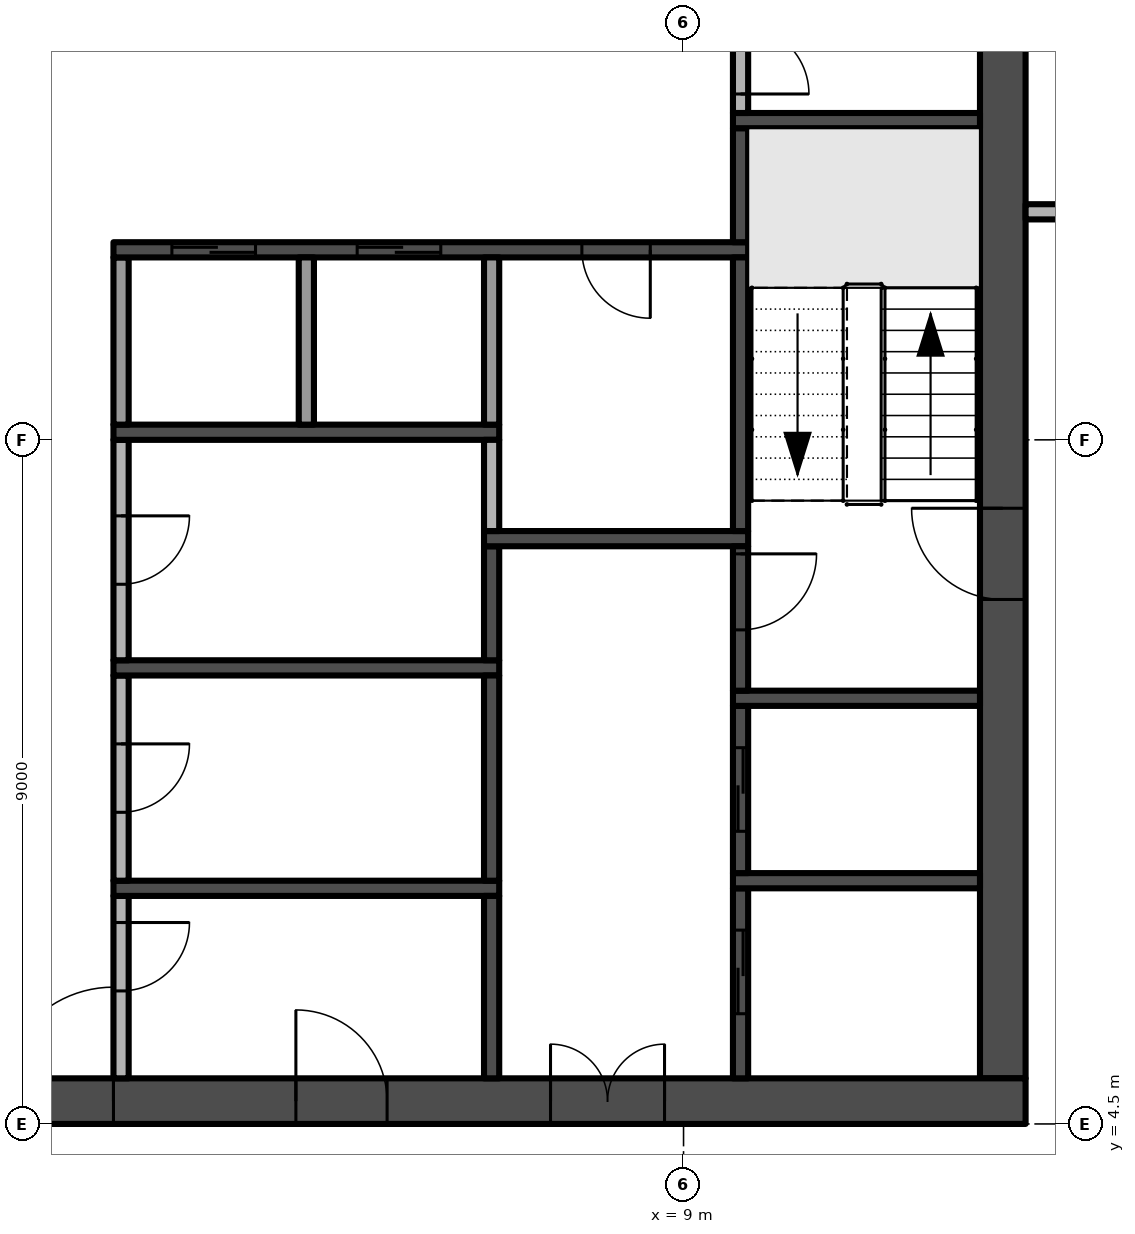
"""IFC4 building model, lengths in metres.
Left out: names, types, materials, properties, quantities, classifications, styles, units other than length and angle.
Written with IfcOpenShell. Run it as: python <this file> out.ifc"""

import sys

from ifc_helpers import new_model, si_unit, direction, frame, frame_2d, origin, place, context, subcontext, project, spatial, rectangle, extrude, element, fill, save


model = new_model("IFC4")
c1 = context("Model", 3, precision=1e-05, world=origin(), true_north=direction((0.0, 1.0)))
c2 = subcontext(c1, "Body", "Model", "MODEL_VIEW")
j1 = project(units=[si_unit("LENGTHUNIT", "METRE"), si_unit("PLANEANGLEUNIT", "RADIAN")], contexts=[c1])
p1 = place(None, origin())
s1 = spatial("IfcSite", under=j1, at=p1, CompositionType="ELEMENT")
p2 = place(p1, origin())
s2 = spatial("IfcBuilding", under=s1, at=p2, CompositionType="ELEMENT")
p3 = place(p2, frame((0.0, 0.0, 230.0)))
s3 = spatial("IfcBuildingStorey", under=s2, at=p3, CompositionType="ELEMENT", Elevation=230.0)
p4 = place(p3, frame((-13.5, 4.8, -0.3), z_axis=(0.0, 0.0, 1.0), x_axis=(1.0, 0.0, 0.0)))
e1 = element("IfcWall", 1, at=p4, inside=s3, PredefinedType="SHEAR", context=c2, shape_type="SweptSolid", body=[
    extrude(rectangle(XDim=27.0, YDim=0.6, at=frame_2d((13.5, 0.0))), origin(), (0.0, 0.0, 1.0), 3.8),
])
p5 = place(p4, frame((12.0, 0.0, 0.3)))
e2 = element("IfcOpeningElement", 2, at=p5, cuts=e1, PredefinedType="OPENING", context=c2, shape_type="SweptSolid", body=[
    extrude(rectangle(XDim=3.0, YDim=2.4, at=frame_2d((1.5, 1.2))), frame((0.0, 0.31, 0.0), z_axis=(0.0, -1.0, 0.0), x_axis=(1.0, 0.0, 0.0)), (0.0, 0.0, 1.0), 0.62),
])
p6 = place(p4, frame((4.9, 0.0, 0.3)))
e3 = element("IfcOpeningElement", 3, at=p6, cuts=e1, PredefinedType="OPENING", context=c2, shape_type="SweptSolid", body=[
    extrude(rectangle(XDim=1.2, YDim=2.2, at=frame_2d((0.6, 1.1))), frame((0.0, 0.31, 0.0), z_axis=(0.0, -1.0, 0.0), x_axis=(1.0, 0.0, 0.0)), (0.0, 0.0, 1.0), 0.62),
])
p7 = place(p4, frame((20.75, 0.0, 0.3)))
e4 = element("IfcOpeningElement", 4, at=p7, cuts=e1, PredefinedType="OPENING", context=c2, shape_type="SweptSolid", body=[
    extrude(rectangle(XDim=1.5, YDim=2.2, at=frame_2d((0.75, 1.1))), frame((0.0, 0.31, 0.0), z_axis=(0.0, -1.0, 0.0), x_axis=(1.0, 0.0, 0.0)), (0.0, 0.0, 1.0), 0.62),
])
p8 = place(p4, frame((17.4, 0.0, 0.3)))
e5 = element("IfcOpeningElement", 5, at=p8, cuts=e1, PredefinedType="OPENING", context=c2, shape_type="SweptSolid", body=[
    extrude(rectangle(XDim=1.2, YDim=2.2, at=frame_2d((0.6, 1.1))), frame((0.0, 0.31, 0.0), z_axis=(0.0, -1.0, 0.0), x_axis=(1.0, 0.0, 0.0)), (0.0, 0.0, 1.0), 0.62),
])
p9 = place(p3, frame((13.2, 5.1, -0.3), z_axis=(0.0, 0.0, 1.0), x_axis=(0.0, 1.0, 0.0)))
e6 = element("IfcWall", 6, at=p9, inside=s3, PredefinedType="SHEAR", context=c2, shape_type="SweptSolid", body=[
    extrude(rectangle(XDim=16.8, YDim=0.6, at=frame_2d((8.4, 0.0))), origin(), (0.0, 0.0, 1.0), 3.8),
])
p10 = place(p9, frame((6.3, 0.0, 0.3)))
e7 = element("IfcOpeningElement", 7, at=p10, cuts=e6, PredefinedType="OPENING", context=c2, shape_type="SweptSolid", body=[
    extrude(rectangle(XDim=1.2, YDim=2.2, at=frame_2d((0.6, 1.1))), frame((0.0, 0.31, 0.0), z_axis=(0.0, -1.0, 0.0), x_axis=(1.0, 0.0, 0.0)), (0.0, 0.0, 1.0), 0.62),
])
p11 = place(p3, frame((1.6, 7.5, 0.0), z_axis=(0.0, 0.0, 1.0), x_axis=(0.0, -1.0, 0.0)))
e8 = element("IfcWall", 8, at=p11, inside=s3, PredefinedType="PARTITIONING", context=c2, shape_type="SweptSolid", body=[
    extrude(rectangle(XDim=2.4, YDim=0.2, at=frame_2d((1.2, 0.0))), origin(), (0.0, 0.0, 1.0), 3.5),
])
p12 = place(p11, frame((0.35, 0.0, 0.0)))
e9 = element("IfcOpeningElement", 9, at=p12, cuts=e8, PredefinedType="OPENING", context=c2, shape_type="SweptSolid", body=[
    extrude(rectangle(XDim=0.9, YDim=2.1, at=frame_2d((0.45, 1.05))), frame((0.0, 0.11, 0.0), z_axis=(0.0, -1.0, 0.0), x_axis=(1.0, 0.0, 0.0)), (0.0, 0.0, 1.0), 0.22),
])
p13 = place(p3, frame((1.5, 7.6, 0.0), z_axis=(0.0, 0.0, 1.0), x_axis=(1.0, 0.0, 0.0)))
e10 = element("IfcWall", 10, at=p13, inside=s3, PredefinedType="SHEAR", context=c2, shape_type="SweptSolid", body=[
    extrude(rectangle(XDim=5.075, YDim=0.2, at=frame_2d((2.538, 0.0))), origin(), (0.0, 0.0, 1.0), 3.5),
])
p14 = place(p3, frame((1.6, 10.4, 0.0), z_axis=(0.0, 0.0, 1.0), x_axis=(0.0, -1.0, 0.0)))
e11 = element("IfcWall", 11, at=p14, inside=s3, PredefinedType="PARTITIONING", context=c2, shape_type="SweptSolid", body=[
    extrude(rectangle(XDim=2.7, YDim=0.2, at=frame_2d((1.35, 0.0))), origin(), (0.0, 0.0, 1.0), 3.5),
])
p15 = place(p14, frame((0.9, 0.0, 0.0)))
e12 = element("IfcOpeningElement", 12, at=p15, cuts=e11, PredefinedType="OPENING", context=c2, shape_type="SweptSolid", body=[
    extrude(rectangle(XDim=0.9, YDim=2.1, at=frame_2d((0.45, 1.05))), frame((0.0, 0.11, 0.0), z_axis=(0.0, -1.0, 0.0), x_axis=(1.0, 0.0, 0.0)), (0.0, 0.0, 1.0), 0.22),
])
p16 = place(p3, frame((1.5, 10.5, 0.0), z_axis=(0.0, 0.0, 1.0), x_axis=(1.0, 0.0, 0.0)))
e13 = element("IfcWall", 13, at=p16, inside=s3, PredefinedType="SHEAR", context=c2, shape_type="SweptSolid", body=[
    extrude(rectangle(XDim=5.075, YDim=0.2, at=frame_2d((2.538, 0.0))), origin(), (0.0, 0.0, 1.0), 3.5),
])
p17 = place(p3, frame((1.6, 13.5, 0.0), z_axis=(0.0, 0.0, 1.0), x_axis=(0.0, -1.0, 0.0)))
e14 = element("IfcWall", 14, at=p17, inside=s3, PredefinedType="PARTITIONING", context=c2, shape_type="SweptSolid", body=[
    extrude(rectangle(XDim=2.9, YDim=0.2, at=frame_2d((1.45, 0.0))), origin(), (0.0, 0.0, 1.0), 3.5),
])
p18 = place(p17, frame((1.0, 0.0, 0.0)))
e15 = element("IfcOpeningElement", 15, at=p18, cuts=e14, PredefinedType="OPENING", context=c2, shape_type="SweptSolid", body=[
    extrude(rectangle(XDim=0.9, YDim=2.1, at=frame_2d((0.45, 1.05))), frame((0.0, 0.11, 0.0), z_axis=(0.0, -1.0, 0.0), x_axis=(1.0, 0.0, 0.0)), (0.0, 0.0, 1.0), 0.22),
])
p19 = place(p3, frame((1.5, 13.6, 0.0), z_axis=(0.0, 0.0, 1.0), x_axis=(1.0, 0.0, 0.0)))
e16 = element("IfcWall", 16, at=p19, inside=s3, PredefinedType="SHEAR", context=c2, shape_type="SweptSolid", body=[
    extrude(rectangle(XDim=5.075, YDim=0.2, at=frame_2d((2.538, 0.0))), origin(), (0.0, 0.0, 1.0), 3.5),
])
p20 = place(p3, frame((1.6, 13.7, 0.0), z_axis=(0.0, 0.0, 1.0), x_axis=(0.0, 1.0, 0.0)))
e17 = element("IfcWall", 17, at=p20, inside=s3, PredefinedType="PARTITIONING", context=c2, shape_type="SweptSolid", body=[
    extrude(rectangle(XDim=2.2, YDim=0.2, at=frame_2d((1.1, 0.0))), origin(), (0.0, 0.0, 1.0), 3.5),
])
p21 = place(p3, frame((9.85, 16.0, 0.0), z_axis=(0.0, 0.0, 1.0), x_axis=(-1.0, 0.0, 0.0)))
e18 = element("IfcWall", 18, at=p21, inside=s3, PredefinedType="SHEAR", context=c2, shape_type="SweptSolid", body=[
    extrude(rectangle(XDim=8.35, YDim=0.2, at=frame_2d((4.175, 0.0))), origin(), (0.0, 0.0, 1.0), 3.5),
])
p22 = place(p21, frame((6.481, 0.0, 0.0)))
e19 = element("IfcOpeningElement", 19, at=p22, cuts=e18, PredefinedType="OPENING", context=c2, shape_type="SweptSolid", body=[
    extrude(rectangle(XDim=1.1, YDim=2.1, at=frame_2d((0.55, 1.05))), frame((0.0, 0.11, 0.0), z_axis=(0.0, -1.0, 0.0), x_axis=(1.0, 0.0, 0.0)), (0.0, 0.0, 1.0), 0.22),
])
p23 = place(p21, frame((4.044, 0.0, 0.0)))
e20 = element("IfcOpeningElement", 20, at=p23, cuts=e18, PredefinedType="OPENING", context=c2, shape_type="SweptSolid", body=[
    extrude(rectangle(XDim=1.1, YDim=2.1, at=frame_2d((0.55, 1.05))), frame((0.0, 0.11, 0.0), z_axis=(0.0, -1.0, 0.0), x_axis=(1.0, 0.0, 0.0)), (0.0, 0.0, 1.0), 0.22),
])
p24 = place(p21, frame((1.288, 0.0, 0.0)))
e21 = element("IfcOpeningElement", 21, at=p24, cuts=e18, PredefinedType="OPENING", context=c2, shape_type="SweptSolid", body=[
    extrude(rectangle(XDim=0.9, YDim=2.1, at=frame_2d((0.45, 1.05))), frame((0.0, 0.11, 0.0), z_axis=(0.0, -1.0, 0.0), x_axis=(1.0, 0.0, 0.0)), (0.0, 0.0, 1.0), 0.22),
])
p25 = place(p3, frame((4.037, 13.7, 0.0), z_axis=(0.0, 0.0, 1.0), x_axis=(0.0, 1.0, 0.0)))
e22 = element("IfcWall", 22, at=p25, inside=s3, PredefinedType="PARTITIONING", context=c2, shape_type="SweptSolid", body=[
    extrude(rectangle(XDim=2.2, YDim=0.2, at=frame_2d((1.1, 0.0))), origin(), (0.0, 0.0, 1.0), 3.5),
])
p26 = place(p3, frame((6.475, 5.1, 0.0), z_axis=(0.0, 0.0, 1.0), x_axis=(0.0, 1.0, 0.0)))
e23 = element("IfcWall", 23, at=p26, inside=s3, PredefinedType="SHEAR", context=c2, shape_type="SweptSolid", body=[
    extrude(rectangle(XDim=2.4, YDim=0.2, at=frame_2d((1.2, 0.0))), origin(), (0.0, 0.0, 1.0), 3.5),
])
p27 = place(p3, frame((6.475, 7.7, 0.0), z_axis=(0.0, 0.0, 1.0), x_axis=(0.0, 1.0, 0.0)))
e24 = element("IfcWall", 24, at=p27, inside=s3, PredefinedType="SHEAR", context=c2, shape_type="SweptSolid", body=[
    extrude(rectangle(XDim=2.7, YDim=0.2, at=frame_2d((1.35, 0.0))), origin(), (0.0, 0.0, 1.0), 3.5),
])
p28 = place(p3, frame((6.475, 10.6, 0.0), z_axis=(0.0, 0.0, 1.0), x_axis=(0.0, 1.0, 0.0)))
e25 = element("IfcWall", 25, at=p28, inside=s3, PredefinedType="SHEAR", context=c2, shape_type="SweptSolid", body=[
    extrude(rectangle(XDim=1.5, YDim=0.2, at=frame_2d((0.75, 0.0))), origin(), (0.0, 0.0, 1.0), 3.5),
])
p29 = place(p3, frame((6.375, 12.2, 0.0), z_axis=(0.0, 0.0, 1.0), x_axis=(1.0, 0.0, 0.0)))
e26 = element("IfcWall", 26, at=p29, inside=s3, PredefinedType="SHEAR", context=c2, shape_type="SweptSolid", body=[
    extrude(rectangle(XDim=3.475, YDim=0.2, at=frame_2d((1.738, 0.0))), origin(), (0.0, 0.0, 1.0), 3.5),
])
p30 = place(p3, frame((6.475, 12.3, 0.0), z_axis=(0.0, 0.0, 1.0), x_axis=(0.0, 1.0, 0.0)))
e27 = element("IfcWall", 27, at=p30, inside=s3, PredefinedType="PARTITIONING", context=c2, shape_type="SweptSolid", body=[
    extrude(rectangle(XDim=1.2, YDim=0.2, at=frame_2d((0.6, 0.0))), origin(), (0.0, 0.0, 1.0), 3.5),
])
p31 = place(p3, frame((6.475, 13.7, 0.0), z_axis=(0.0, 0.0, 1.0), x_axis=(0.0, 1.0, 0.0)))
e28 = element("IfcWall", 28, at=p31, inside=s3, PredefinedType="PARTITIONING", context=c2, shape_type="SweptSolid", body=[
    extrude(rectangle(XDim=2.2, YDim=0.2, at=frame_2d((1.1, 0.0))), origin(), (0.0, 0.0, 1.0), 3.5),
])
p32 = place(p3, frame((9.75, 5.1, 0.0), z_axis=(0.0, 0.0, 1.0), x_axis=(0.0, 1.0, 0.0)))
e29 = element("IfcWall", 29, at=p32, inside=s3, PredefinedType="SHEAR", context=c2, shape_type="SweptSolid", body=[
    extrude(rectangle(XDim=2.5, YDim=0.2, at=frame_2d((1.25, 0.0))), origin(), (0.0, 0.0, 1.0), 3.5),
])
p33 = place(p32, frame((0.85, 0.0, 0.0)))
e30 = element("IfcOpeningElement", 30, at=p33, cuts=e29, PredefinedType="OPENING", context=c2, shape_type="SweptSolid", body=[
    extrude(rectangle(XDim=1.1, YDim=2.1, at=frame_2d((0.55, 1.05))), frame((0.0, 0.11, 0.0), z_axis=(0.0, -1.0, 0.0), x_axis=(1.0, 0.0, 0.0)), (0.0, 0.0, 1.0), 0.22),
])
p34 = place(p3, frame((9.65, 7.7, 0.0), z_axis=(0.0, 0.0, 1.0), x_axis=(1.0, 0.0, 0.0)))
e31 = element("IfcWall", 31, at=p34, inside=s3, PredefinedType="SHEAR", context=c2, shape_type="SweptSolid", body=[
    extrude(rectangle(XDim=3.25, YDim=0.2, at=frame_2d((1.625, 0.0))), origin(), (0.0, 0.0, 1.0), 3.5),
])
p35 = place(p3, frame((9.75, 7.8, 0.0), z_axis=(0.0, 0.0, 1.0), x_axis=(0.0, 1.0, 0.0)))
e32 = element("IfcWall", 32, at=p35, inside=s3, PredefinedType="SHEAR", context=c2, shape_type="SweptSolid", body=[
    extrude(rectangle(XDim=2.2, YDim=0.2, at=frame_2d((1.1, 0.0))), origin(), (0.0, 0.0, 1.0), 3.5),
])
p36 = place(p35, frame((0.55, 0.0, 0.0)))
e33 = element("IfcOpeningElement", 33, at=p36, cuts=e32, PredefinedType="OPENING", context=c2, shape_type="SweptSolid", body=[
    extrude(rectangle(XDim=1.1, YDim=2.1, at=frame_2d((0.55, 1.05))), frame((0.0, 0.11, 0.0), z_axis=(0.0, -1.0, 0.0), x_axis=(1.0, 0.0, 0.0)), (0.0, 0.0, 1.0), 0.22),
])
p37 = place(p3, frame((9.65, 10.1, 0.0), z_axis=(0.0, 0.0, 1.0), x_axis=(1.0, 0.0, 0.0)))
e34 = element("IfcWall", 34, at=p37, inside=s3, PredefinedType="SHEAR", context=c2, shape_type="SweptSolid", body=[
    extrude(rectangle(XDim=3.25, YDim=0.2, at=frame_2d((1.625, 0.0))), origin(), (0.0, 0.0, 1.0), 3.5),
])
p38 = place(p3, frame((9.75, 12.1, 0.0), z_axis=(0.0, 0.0, 1.0), x_axis=(0.0, -1.0, 0.0)))
e35 = element("IfcWall", 35, at=p38, inside=s3, PredefinedType="SHEAR", context=c2, shape_type="SweptSolid", body=[
    extrude(rectangle(XDim=1.9, YDim=0.2, at=frame_2d((0.95, 0.0))), origin(), (0.0, 0.0, 1.0), 3.5),
])
p39 = place(p38, frame((0.1, 0.0, 0.0)))
e36 = element("IfcOpeningElement", 36, at=p39, cuts=e35, PredefinedType="OPENING", context=c2, shape_type="SweptSolid", body=[
    extrude(rectangle(XDim=1.0, YDim=2.2, at=frame_2d((0.5, 1.1))), frame((0.0, 0.11, 0.0), z_axis=(0.0, -1.0, 0.0), x_axis=(1.0, 0.0, 0.0)), (0.0, 0.0, 1.0), 0.22),
])
p40 = place(p3, frame((9.75, 12.3, 0.0), z_axis=(0.0, 0.0, 1.0), x_axis=(0.0, 1.0, 0.0)))
e37 = element("IfcWall", 37, at=p40, inside=s3, PredefinedType="SHEAR", context=c2, shape_type="SweptSolid", body=[
    extrude(rectangle(XDim=3.6, YDim=0.2, at=frame_2d((1.8, 0.0))), origin(), (0.0, 0.0, 1.0), 3.5),
])
p41 = place(p3, frame((9.75, 16.1, 0.0), z_axis=(0.0, 0.0, 1.0), x_axis=(0.0, 1.0, 0.0)))
e38 = element("IfcWall", 38, at=p41, inside=s3, PredefinedType="SHEAR", context=c2, shape_type="SweptSolid", body=[
    extrude(rectangle(XDim=1.5, YDim=0.2, at=frame_2d((0.75, 0.0))), origin(), (0.0, 0.0, 1.0), 3.5),
])
p42 = place(p3, frame((9.65, 17.7, 0.0), z_axis=(0.0, 0.0, 1.0), x_axis=(1.0, 0.0, 0.0)))
e39 = element("IfcWall", 39, at=p42, inside=s3, PredefinedType="SHEAR", context=c2, shape_type="SweptSolid", body=[
    extrude(rectangle(XDim=3.25, YDim=0.2, at=frame_2d((1.625, 0.0))), origin(), (0.0, 0.0, 1.0), 3.5),
])
p43 = place(p3, frame((9.75, 19.2, 0.0), z_axis=(0.0, 0.0, 1.0), x_axis=(0.0, -1.0, 0.0)))
e40 = element("IfcWall", 40, at=p43, inside=s3, PredefinedType="PARTITIONING", context=c2, shape_type="SweptSolid", body=[
    extrude(rectangle(XDim=1.4, YDim=0.2, at=frame_2d((0.7, 0.0))), origin(), (0.0, 0.0, 1.0), 3.5),
])
p44 = place(p43, frame((0.25, 0.0, 0.0)))
e41 = element("IfcOpeningElement", 41, at=p44, cuts=e40, PredefinedType="OPENING", context=c2, shape_type="SweptSolid", body=[
    extrude(rectangle(XDim=0.9, YDim=2.1, at=frame_2d((0.45, 1.05))), frame((0.0, 0.11, 0.0), z_axis=(0.0, -1.0, 0.0), x_axis=(1.0, 0.0, 0.0)), (0.0, 0.0, 1.0), 0.22),
])
p45 = place(p3, frame((13.5, 16.5, 0.0), z_axis=(0.0, 0.0, 1.0), x_axis=(1.0, 0.0, 0.0)))
e42 = element("IfcWall", 42, at=p45, inside=s3, PredefinedType="PARTITIONING", context=c2, shape_type="SweptSolid", body=[
    extrude(rectangle(XDim=3.825, YDim=0.2, at=frame_2d((1.913, 0.0))), origin(), (0.0, 0.0, 1.0), 3.5),
])
p46 = place(p45, frame((1.55, 0.0, 0.0)))
e43 = element("IfcOpeningElement", 43, at=p46, cuts=e42, PredefinedType="OPENING", context=c2, shape_type="SweptSolid", body=[
    extrude(rectangle(XDim=0.9, YDim=2.1, at=frame_2d((0.45, 1.05))), frame((0.0, 0.11, 0.0), z_axis=(0.0, -1.0, 0.0), x_axis=(1.0, 0.0, 0.0)), (0.0, 0.0, 1.0), 0.22),
])
p47 = place(p5, frame((3.0, 0.0, 0.0), z_axis=(0.0, 0.0, 1.0), x_axis=(-1.0, 0.0, 0.0)))
e44 = element("IfcDoor", 44, at=p47, inside=s3, OperationType="DOUBLE_DOOR_SINGLE_SWING", PredefinedType="DOOR", context=c2, shape_type="SweptSolid", body=[
    extrude(rectangle(XDim=3.0, YDim=2.4, at=frame_2d((1.5, 1.2))), frame((0.0, 0.025, 0.0), z_axis=(0.0, -1.0, 0.0), x_axis=(1.0, 0.0, 0.0)), (0.0, 0.0, 1.0), 0.05),
])
fill(e2, e44)
p48 = place(p10, frame((1.2, 0.0, 0.0), z_axis=(0.0, 0.0, 1.0), x_axis=(-1.0, 0.0, 0.0)))
e45 = element("IfcDoor", 45, at=p48, inside=s3, OperationType="SINGLE_SWING_LEFT", PredefinedType="DOOR", context=c2, shape_type="SweptSolid", body=[
    extrude(rectangle(XDim=1.2, YDim=2.2, at=frame_2d((0.6, 1.1))), frame((0.0, 0.025, 0.0), z_axis=(0.0, -1.0, 0.0), x_axis=(1.0, 0.0, 0.0)), (0.0, 0.0, 1.0), 0.05),
])
fill(e7, e45)
p49 = place(p7, frame((1.5, 0.0, 0.0), z_axis=(0.0, 0.0, 1.0), x_axis=(-1.0, 0.0, 0.0)))
e46 = element("IfcDoor", 46, at=p49, inside=s3, OperationType="DOUBLE_DOOR_SINGLE_SWING", PredefinedType="DOOR", context=c2, shape_type="SweptSolid", body=[
    extrude(rectangle(XDim=1.5, YDim=2.2, at=frame_2d((0.75, 1.1))), frame((0.0, 0.025, 0.0), z_axis=(0.0, -1.0, 0.0), x_axis=(1.0, 0.0, 0.0)), (0.0, 0.0, 1.0), 0.05),
])
fill(e4, e46)
p50 = place(p8, frame((1.2, 0.0, 0.0), z_axis=(0.0, 0.0, 1.0), x_axis=(-1.0, 0.0, 0.0)))
e47 = element("IfcDoor", 47, at=p50, inside=s3, OperationType="SINGLE_SWING_RIGHT", PredefinedType="DOOR", context=c2, shape_type="SweptSolid", body=[
    extrude(rectangle(XDim=1.2, YDim=2.2, at=frame_2d((0.6, 1.1))), frame((0.0, 0.025, 0.0), z_axis=(0.0, -1.0, 0.0), x_axis=(1.0, 0.0, 0.0)), (0.0, 0.0, 1.0), 0.05),
])
fill(e5, e47)
p51 = place(p39, origin())
e48 = element("IfcDoor", 48, at=p51, inside=s3, OperationType="SINGLE_SWING_LEFT", PredefinedType="DOOR", context=c2, shape_type="SweptSolid", body=[
    extrude(rectangle(XDim=1.0, YDim=2.2, at=frame_2d((0.5, 1.1))), frame((0.0, 0.025, 0.0), z_axis=(0.0, -1.0, 0.0), x_axis=(1.0, 0.0, 0.0)), (0.0, 0.0, 1.0), 0.05),
])
fill(e36, e48)
p52 = place(p22, origin())
e49 = element("IfcDoor", 49, at=p52, inside=s3, OperationType="SLIDING_TO_RIGHT", PredefinedType="DOOR", context=c2, shape_type="SweptSolid", body=[
    extrude(rectangle(XDim=1.1, YDim=2.1, at=frame_2d((0.55, 1.05))), frame((0.0, 0.025, 0.0), z_axis=(0.0, -1.0, 0.0), x_axis=(1.0, 0.0, 0.0)), (0.0, 0.0, 1.0), 0.05),
])
fill(e19, e49)
p53 = place(p23, origin())
e50 = element("IfcDoor", 50, at=p53, inside=s3, OperationType="SLIDING_TO_RIGHT", PredefinedType="DOOR", context=c2, shape_type="SweptSolid", body=[
    extrude(rectangle(XDim=1.1, YDim=2.1, at=frame_2d((0.55, 1.05))), frame((0.0, 0.025, 0.0), z_axis=(0.0, -1.0, 0.0), x_axis=(1.0, 0.0, 0.0)), (0.0, 0.0, 1.0), 0.05),
])
fill(e20, e50)
p54 = place(p33, origin())
e51 = element("IfcDoor", 51, at=p54, inside=s3, OperationType="SLIDING_TO_RIGHT", PredefinedType="DOOR", context=c2, shape_type="SweptSolid", body=[
    extrude(rectangle(XDim=1.1, YDim=2.1, at=frame_2d((0.55, 1.05))), frame((0.0, 0.025, 0.0), z_axis=(0.0, -1.0, 0.0), x_axis=(1.0, 0.0, 0.0)), (0.0, 0.0, 1.0), 0.05),
])
fill(e30, e51)
p55 = place(p36, origin())
e52 = element("IfcDoor", 52, at=p55, inside=s3, OperationType="SLIDING_TO_RIGHT", PredefinedType="DOOR", context=c2, shape_type="SweptSolid", body=[
    extrude(rectangle(XDim=1.1, YDim=2.1, at=frame_2d((0.55, 1.05))), frame((0.0, 0.025, 0.0), z_axis=(0.0, -1.0, 0.0), x_axis=(1.0, 0.0, 0.0)), (0.0, 0.0, 1.0), 0.05),
])
fill(e33, e52)
p56 = place(p12, origin())
e53 = element("IfcDoor", 53, at=p56, inside=s3, OperationType="SINGLE_SWING_LEFT", PredefinedType="DOOR", context=c2, shape_type="SweptSolid", body=[
    extrude(rectangle(XDim=0.9, YDim=2.1, at=frame_2d((0.45, 1.05))), frame((0.0, 0.025, 0.0), z_axis=(0.0, -1.0, 0.0), x_axis=(1.0, 0.0, 0.0)), (0.0, 0.0, 1.0), 0.05),
])
fill(e9, e53)
p57 = place(p15, origin())
e54 = element("IfcDoor", 54, at=p57, inside=s3, OperationType="SINGLE_SWING_LEFT", PredefinedType="DOOR", context=c2, shape_type="SweptSolid", body=[
    extrude(rectangle(XDim=0.9, YDim=2.1, at=frame_2d((0.45, 1.05))), frame((0.0, 0.025, 0.0), z_axis=(0.0, -1.0, 0.0), x_axis=(1.0, 0.0, 0.0)), (0.0, 0.0, 1.0), 0.05),
])
fill(e12, e54)
p58 = place(p18, origin())
e55 = element("IfcDoor", 55, at=p58, inside=s3, OperationType="SINGLE_SWING_LEFT", PredefinedType="DOOR", context=c2, shape_type="SweptSolid", body=[
    extrude(rectangle(XDim=0.9, YDim=2.1, at=frame_2d((0.45, 1.05))), frame((0.0, 0.025, 0.0), z_axis=(0.0, -1.0, 0.0), x_axis=(1.0, 0.0, 0.0)), (0.0, 0.0, 1.0), 0.05),
])
fill(e15, e55)
p59 = place(p24, origin())
e56 = element("IfcDoor", 56, at=p59, inside=s3, OperationType="SINGLE_SWING_LEFT", PredefinedType="DOOR", context=c2, shape_type="SweptSolid", body=[
    extrude(rectangle(XDim=0.9, YDim=2.1, at=frame_2d((0.45, 1.05))), frame((0.0, 0.025, 0.0), z_axis=(0.0, -1.0, 0.0), x_axis=(1.0, 0.0, 0.0)), (0.0, 0.0, 1.0), 0.05),
])
fill(e21, e56)
p60 = place(p44, origin())
e57 = element("IfcDoor", 57, at=p60, inside=s3, OperationType="SINGLE_SWING_RIGHT", PredefinedType="DOOR", context=c2, shape_type="SweptSolid", body=[
    extrude(rectangle(XDim=0.9, YDim=2.1, at=frame_2d((0.45, 1.05))), frame((0.0, 0.025, 0.0), z_axis=(0.0, -1.0, 0.0), x_axis=(1.0, 0.0, 0.0)), (0.0, 0.0, 1.0), 0.05),
])
fill(e41, e57)
save(model, sys.argv[1])
